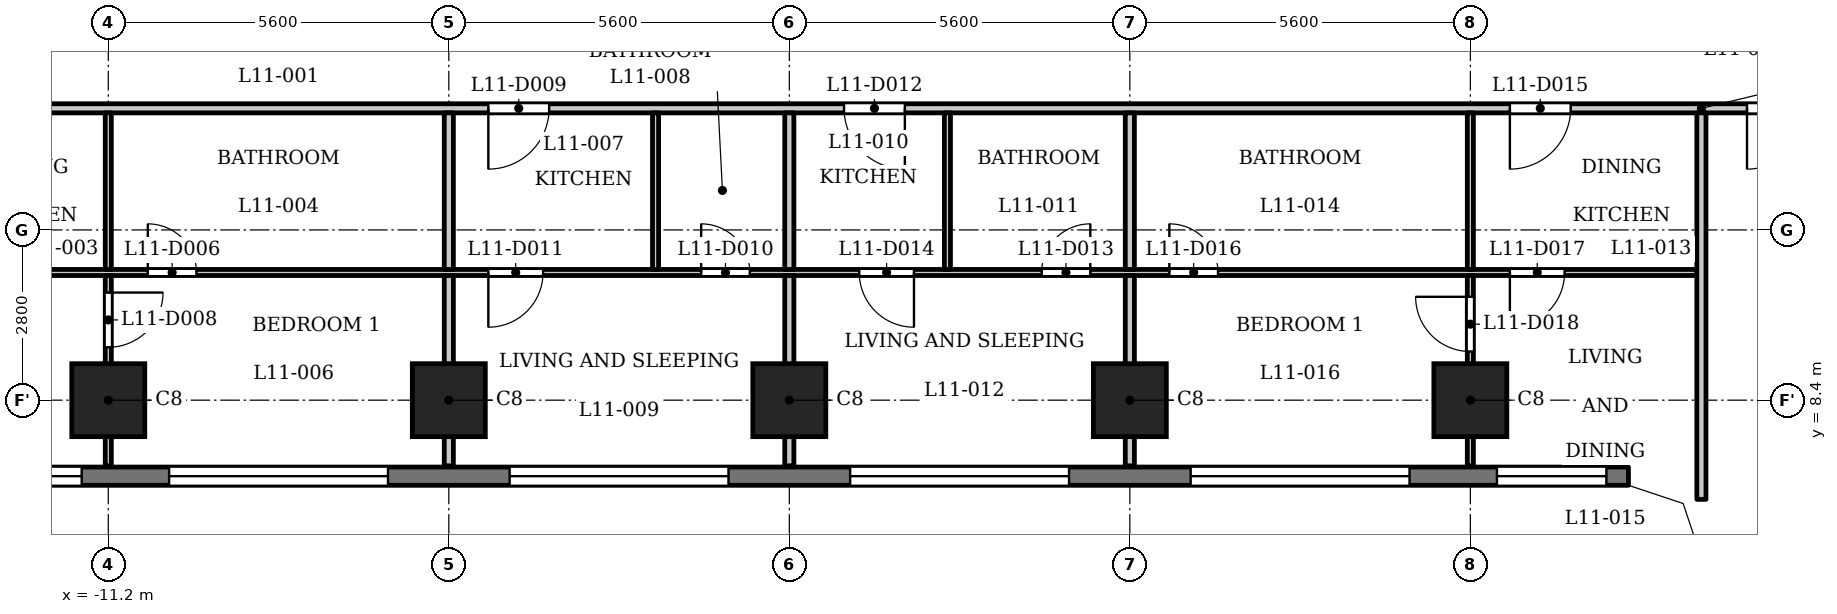
"""IFC4 building model, lengths in metres.
Left out: names, types, materials, properties, quantities, classifications, styles, units other than length and angle.
Written with IfcOpenShell. Run it as: python <this file> out.ifc"""

import sys

from ifc_helpers import new_model, si_unit, direction, frame, frame_2d, origin, origin_2d, place, context, subcontext, project, spatial, polyline, rectangle, outline, extrude, element, fill, save


model = new_model("IFC4")
c1 = context("Model", 3, precision=1e-05, world=origin(), true_north=direction((0.0, 1.0)))
c2 = subcontext(c1, "Body", "Model", "MODEL_VIEW")
j1 = project(units=[si_unit("LENGTHUNIT", "METRE"), si_unit("PLANEANGLEUNIT", "RADIAN")], contexts=[c1])
p1 = place(None, origin())
s1 = spatial("IfcSite", under=j1, at=p1, CompositionType="ELEMENT")
p2 = place(p1, origin())
s2 = spatial("IfcBuilding", under=s1, at=p2, CompositionType="ELEMENT")
p3 = place(p2, frame((0.0, 0.0, 48.0)))
s3 = spatial("IfcBuildingStorey", under=s2, at=p3, CompositionType="ELEMENT", Elevation=48.0)
for number, where, z_axis, x_axis in (
    (1, (-11.2, 8.4, 0.0), (0.0, 0.0, 1.0), (1.0, 0.0, 0.0)),
    (2, (-5.6, 8.4, 0.0), (0.0, 0.0, 1.0), (1.0, 0.0, 0.0)),
    (3, (0.0, 8.4, 0.0), (0.0, 0.0, 1.0), (1.0, 0.0, 0.0)),
    (4, (5.6, 8.4, 0.0), (0.0, 0.0, 1.0), (1.0, 0.0, 0.0)),
    (5, (11.2, 8.4, 0.0), (0.0, 0.0, 1.0), (1.0, 0.0, 0.0)),
):
    element("IfcColumn", number, at=place(p3, frame(where, z_axis=z_axis, x_axis=x_axis)), inside=s3, PredefinedType="COLUMN", context=c2, shape_type="SweptSolid", body=[
        extrude(rectangle(XDim=1.2, YDim=1.2, at=origin_2d()), origin(), (0.0, 0.0, 1.0), 3.5),
    ])
p4 = place(p3, frame((-13.8, 7.15, 0.0), z_axis=(0.0, 0.0, 1.0), x_axis=(1.0, 0.0, 0.0)))
e6 = element("IfcWall", 6, at=p4, inside=s3, PredefinedType="SOLIDWALL", context=c2, shape_type="SweptSolid", body=[
    extrude(rectangle(XDim=27.6, YDim=0.3, at=frame_2d((13.8, 0.0))), origin(), (0.0, 0.0, 1.0), 3.2),
])
p5 = place(p4, frame((0.363, 0.0, 0.9)))
e7 = element("IfcOpeningElement", 7, at=p5, cuts=e6, PredefinedType="OPENING", context=c2, shape_type="SweptSolid", body=[
    extrude(rectangle(XDim=1.8, YDim=1.25, at=frame_2d((0.9, 0.625))), frame((0.0, 0.16, 0.0), z_axis=(0.0, -1.0, 0.0), x_axis=(1.0, 0.0, 0.0)), (0.0, 0.0, 1.0), 0.32),
])
p6 = place(p4, frame((3.6, 0.0, 1.2)))
e8 = element("IfcOpeningElement", 8, at=p6, cuts=e6, PredefinedType="OPENING", context=c2, shape_type="SweptSolid", body=[
    extrude(rectangle(XDim=3.6, YDim=0.95, at=frame_2d((1.8, 0.475))), frame((0.0, 0.16, 0.0), z_axis=(0.0, -1.0, 0.0), x_axis=(1.0, 0.0, 0.0)), (0.0, 0.0, 1.0), 0.32),
])
p7 = place(p4, frame((9.2, 0.0, 1.2)))
e9 = element("IfcOpeningElement", 9, at=p7, cuts=e6, PredefinedType="OPENING", context=c2, shape_type="SweptSolid", body=[
    extrude(rectangle(XDim=3.6, YDim=0.95, at=frame_2d((1.8, 0.475))), frame((0.0, 0.16, 0.0), z_axis=(0.0, -1.0, 0.0), x_axis=(1.0, 0.0, 0.0)), (0.0, 0.0, 1.0), 0.32),
])
p8 = place(p4, frame((14.8, 0.0, 1.2)))
e10 = element("IfcOpeningElement", 10, at=p8, cuts=e6, PredefinedType="OPENING", context=c2, shape_type="SweptSolid", body=[
    extrude(rectangle(XDim=3.6, YDim=0.95, at=frame_2d((1.8, 0.475))), frame((0.0, 0.16, 0.0), z_axis=(0.0, -1.0, 0.0), x_axis=(1.0, 0.0, 0.0)), (0.0, 0.0, 1.0), 0.32),
])
p9 = place(p4, frame((20.4, 0.0, 1.2)))
e11 = element("IfcOpeningElement", 11, at=p9, cuts=e6, PredefinedType="OPENING", context=c2, shape_type="SweptSolid", body=[
    extrude(rectangle(XDim=3.6, YDim=0.95, at=frame_2d((1.8, 0.475))), frame((0.0, 0.16, 0.0), z_axis=(0.0, -1.0, 0.0), x_axis=(1.0, 0.0, 0.0)), (0.0, 0.0, 1.0), 0.32),
])
p10 = place(p4, frame((25.438, 0.0, 0.9)))
e12 = element("IfcOpeningElement", 12, at=p10, cuts=e6, PredefinedType="OPENING", context=c2, shape_type="SweptSolid", body=[
    extrude(rectangle(XDim=1.8, YDim=1.25, at=frame_2d((0.9, 0.625))), frame((0.0, 0.16, 0.0), z_axis=(0.0, -1.0, 0.0), x_axis=(1.0, 0.0, 0.0)), (0.0, 0.0, 1.0), 0.32),
])
p11 = place(p3, frame((-14.925, 10.5, 0.0), z_axis=(0.0, 0.0, 1.0), x_axis=(1.0, 0.0, 0.0)))
e13 = element("IfcWall", 13, at=p11, inside=s3, PredefinedType="PARTITIONING", context=c2, shape_type="SweptSolid", body=[
    extrude(rectangle(XDim=29.85, YDim=0.1, at=frame_2d((14.925, 0.0))), origin(), (0.0, 0.0, 1.0), 3.2),
])
p12 = place(p11, frame((4.375, 0.0, 0.0)))
e14 = element("IfcOpeningElement", 14, at=p12, cuts=e13, PredefinedType="OPENING", context=c2, shape_type="SweptSolid", body=[
    extrude(rectangle(XDim=0.8, YDim=2.1, at=frame_2d((0.4, 1.05))), frame((0.0, 0.06, 0.0), z_axis=(0.0, -1.0, 0.0), x_axis=(1.0, 0.0, 0.0)), (0.0, 0.0, 1.0), 0.12),
])
p13 = place(p11, frame((0.575, 0.0, 0.0)))
e15 = element("IfcOpeningElement", 15, at=p13, cuts=e13, PredefinedType="OPENING", context=c2, shape_type="SweptSolid", body=[
    extrude(rectangle(XDim=0.9, YDim=2.1, at=frame_2d((0.45, 1.05))), frame((0.0, 0.06, 0.0), z_axis=(0.0, -1.0, 0.0), x_axis=(1.0, 0.0, 0.0)), (0.0, 0.0, 1.0), 0.12),
])
p14 = place(p11, frame((13.475, 0.0, 0.0)))
e16 = element("IfcOpeningElement", 16, at=p14, cuts=e13, PredefinedType="OPENING", context=c2, shape_type="SweptSolid", body=[
    extrude(rectangle(XDim=0.8, YDim=2.1, at=frame_2d((0.4, 1.05))), frame((0.0, 0.06, 0.0), z_axis=(0.0, -1.0, 0.0), x_axis=(1.0, 0.0, 0.0)), (0.0, 0.0, 1.0), 0.12),
])
p15 = place(p11, frame((9.975, 0.0, 0.0)))
e17 = element("IfcOpeningElement", 17, at=p15, cuts=e13, PredefinedType="OPENING", context=c2, shape_type="SweptSolid", body=[
    extrude(rectangle(XDim=0.9, YDim=2.1, at=frame_2d((0.45, 1.05))), frame((0.0, 0.06, 0.0), z_axis=(0.0, -1.0, 0.0), x_axis=(1.0, 0.0, 0.0)), (0.0, 0.0, 1.0), 0.12),
])
p16 = place(p11, frame((19.075, 0.0, 0.0)))
e18 = element("IfcOpeningElement", 18, at=p16, cuts=e13, PredefinedType="OPENING", context=c2, shape_type="SweptSolid", body=[
    extrude(rectangle(XDim=0.8, YDim=2.1, at=frame_2d((0.4, 1.05))), frame((0.0, 0.06, 0.0), z_axis=(0.0, -1.0, 0.0), x_axis=(1.0, 0.0, 0.0)), (0.0, 0.0, 1.0), 0.12),
])
p17 = place(p11, frame((16.075, 0.0, 0.0)))
e19 = element("IfcOpeningElement", 19, at=p17, cuts=e13, PredefinedType="OPENING", context=c2, shape_type="SweptSolid", body=[
    extrude(rectangle(XDim=0.9, YDim=2.1, at=frame_2d((0.45, 1.05))), frame((0.0, 0.06, 0.0), z_axis=(0.0, -1.0, 0.0), x_axis=(1.0, 0.0, 0.0)), (0.0, 0.0, 1.0), 0.12),
])
p18 = place(p11, frame((21.175, 0.0, 0.0)))
e20 = element("IfcOpeningElement", 20, at=p18, cuts=e13, PredefinedType="OPENING", context=c2, shape_type="SweptSolid", body=[
    extrude(rectangle(XDim=0.8, YDim=2.1, at=frame_2d((0.4, 1.05))), frame((0.0, 0.06, 0.0), z_axis=(0.0, -1.0, 0.0), x_axis=(1.0, 0.0, 0.0)), (0.0, 0.0, 1.0), 0.12),
])
p19 = place(p11, frame((26.775, 0.0, 0.0)))
e21 = element("IfcOpeningElement", 21, at=p19, cuts=e13, PredefinedType="OPENING", context=c2, shape_type="SweptSolid", body=[
    extrude(rectangle(XDim=0.9, YDim=2.1, at=frame_2d((0.45, 1.05))), frame((0.0, 0.06, 0.0), z_axis=(0.0, -1.0, 0.0), x_axis=(1.0, 0.0, 0.0)), (0.0, 0.0, 1.0), 0.12),
])
p20 = place(p3, frame((-17.4, 13.2, 0.0), z_axis=(0.0, 0.0, 1.0), x_axis=(1.0, 0.0, 0.0)))
e22 = element("IfcWall", 22, at=p20, inside=s3, PredefinedType="PARTITIONING", context=c2, shape_type="SweptSolid", body=[
    extrude(rectangle(XDim=34.8, YDim=0.15, at=frame_2d((17.4, 0.0))), origin(), (0.0, 0.0, 1.0), 3.2),
])
p21 = place(p20, frame((0.75, 0.0, 0.0)))
e23 = element("IfcOpeningElement", 23, at=p21, cuts=e22, PredefinedType="OPENING", context=c2, shape_type="SweptSolid", body=[
    extrude(rectangle(XDim=1.0, YDim=2.1, at=frame_2d((0.5, 1.05))), frame((0.0, 0.085, 0.0), z_axis=(0.0, -1.0, 0.0), x_axis=(1.0, 0.0, 0.0)), (0.0, 0.0, 1.0), 0.17),
])
p22 = place(p20, frame((33.15, 0.0, 0.0)))
e24 = element("IfcOpeningElement", 24, at=p22, cuts=e22, PredefinedType="OPENING", context=c2, shape_type="SweptSolid", body=[
    extrude(rectangle(XDim=1.0, YDim=2.1, at=frame_2d((0.5, 1.05))), frame((0.0, 0.085, 0.0), z_axis=(0.0, -1.0, 0.0), x_axis=(1.0, 0.0, 0.0)), (0.0, 0.0, 1.0), 0.17),
])
p23 = place(p20, frame((3.05, 0.0, 0.0)))
e25 = element("IfcOpeningElement", 25, at=p23, cuts=e22, PredefinedType="OPENING", context=c2, shape_type="SweptSolid", body=[
    extrude(rectangle(XDim=1.0, YDim=2.1, at=frame_2d((0.5, 1.05))), frame((0.0, 0.085, 0.0), z_axis=(0.0, -1.0, 0.0), x_axis=(1.0, 0.0, 0.0)), (0.0, 0.0, 1.0), 0.17),
])
p24 = place(p20, frame((12.45, 0.0, 0.0)))
e26 = element("IfcOpeningElement", 26, at=p24, cuts=e22, PredefinedType="OPENING", context=c2, shape_type="SweptSolid", body=[
    extrude(rectangle(XDim=1.0, YDim=2.1, at=frame_2d((0.5, 1.05))), frame((0.0, 0.085, 0.0), z_axis=(0.0, -1.0, 0.0), x_axis=(1.0, 0.0, 0.0)), (0.0, 0.0, 1.0), 0.17),
])
p25 = place(p20, frame((18.3, 0.0, 0.0)))
e27 = element("IfcOpeningElement", 27, at=p25, cuts=e22, PredefinedType="OPENING", context=c2, shape_type="SweptSolid", body=[
    extrude(rectangle(XDim=1.0, YDim=2.1, at=frame_2d((0.5, 1.05))), frame((0.0, 0.085, 0.0), z_axis=(0.0, -1.0, 0.0), x_axis=(1.0, 0.0, 0.0)), (0.0, 0.0, 1.0), 0.17),
])
p26 = place(p20, frame((29.25, 0.0, 0.0)))
e28 = element("IfcOpeningElement", 28, at=p26, cuts=e22, PredefinedType="OPENING", context=c2, shape_type="SweptSolid", body=[
    extrude(rectangle(XDim=1.0, YDim=2.1, at=frame_2d((0.5, 1.05))), frame((0.0, 0.085, 0.0), z_axis=(0.0, -1.0, 0.0), x_axis=(1.0, 0.0, 0.0)), (0.0, 0.0, 1.0), 0.17),
])
p27 = place(p3, frame((-11.2, 7.32, 0.0), z_axis=(0.0, 0.0, 1.0), x_axis=(0.0, 1.0, 0.0)))
e29 = element("IfcWall", 29, at=p27, inside=s3, PredefinedType="PARTITIONING", context=c2, shape_type="SweptSolid", body=[
    extrude(rectangle(XDim=3.13, YDim=0.1, at=frame_2d((1.565, 0.0))), origin(), (0.0, 0.0, 1.0), 3.2),
])
p28 = place(p27, frame((1.95, 0.0, 0.0)))
e30 = element("IfcOpeningElement", 30, at=p28, cuts=e29, PredefinedType="OPENING", context=c2, shape_type="SweptSolid", body=[
    extrude(rectangle(XDim=0.9, YDim=2.1, at=frame_2d((0.45, 1.05))), frame((0.0, 0.06, 0.0), z_axis=(0.0, -1.0, 0.0), x_axis=(1.0, 0.0, 0.0)), (0.0, 0.0, 1.0), 0.12),
])
p29 = place(p3, frame((-11.2, 10.55, 0.0), z_axis=(0.0, 0.0, 1.0), x_axis=(0.0, 1.0, 0.0)))
e31 = element("IfcWall", 31, at=p29, inside=s3, PredefinedType="PARTITIONING", context=c2, shape_type="SweptSolid", body=[
    extrude(rectangle(XDim=2.575, YDim=0.1, at=frame_2d((1.288, 0.0))), origin(), (0.0, 0.0, 1.0), 3.2),
])
p30 = place(p3, frame((-5.6, 7.32, 0.0), z_axis=(0.0, 0.0, 1.0), x_axis=(0.0, 1.0, 0.0)))
e32 = element("IfcWall", 32, at=p30, inside=s3, PredefinedType="PARTITIONING", context=c2, shape_type="SweptSolid", body=[
    extrude(rectangle(XDim=3.13, YDim=0.15, at=frame_2d((1.565, 0.0))), origin(), (0.0, 0.0, 1.0), 3.2),
])
p31 = place(p3, frame((-5.6, 10.55, 0.0), z_axis=(0.0, 0.0, 1.0), x_axis=(0.0, 1.0, 0.0)))
e33 = element("IfcWall", 33, at=p31, inside=s3, PredefinedType="PARTITIONING", context=c2, shape_type="SweptSolid", body=[
    extrude(rectangle(XDim=2.575, YDim=0.15, at=frame_2d((1.288, 0.0))), origin(), (0.0, 0.0, 1.0), 3.2),
])
p32 = place(p3, frame((-2.2, 10.55, 0.0), z_axis=(0.0, 0.0, 1.0), x_axis=(0.0, 1.0, 0.0)))
e34 = element("IfcWall", 34, at=p32, inside=s3, PredefinedType="PARTITIONING", context=c2, shape_type="SweptSolid", body=[
    extrude(rectangle(XDim=2.575, YDim=0.1, at=frame_2d((1.288, 0.0))), origin(), (0.0, 0.0, 1.0), 3.2),
])
p33 = place(p3, frame((0.0, 7.32, 0.0), z_axis=(0.0, 0.0, 1.0), x_axis=(0.0, 1.0, 0.0)))
e35 = element("IfcWall", 35, at=p33, inside=s3, PredefinedType="PARTITIONING", context=c2, shape_type="SweptSolid", body=[
    extrude(rectangle(XDim=3.13, YDim=0.15, at=frame_2d((1.565, 0.0))), origin(), (0.0, 0.0, 1.0), 3.2),
])
p34 = place(p3, frame((0.0, 10.55, 0.0), z_axis=(0.0, 0.0, 1.0), x_axis=(0.0, 1.0, 0.0)))
e36 = element("IfcWall", 36, at=p34, inside=s3, PredefinedType="PARTITIONING", context=c2, shape_type="SweptSolid", body=[
    extrude(rectangle(XDim=2.575, YDim=0.15, at=frame_2d((1.288, 0.0))), origin(), (0.0, 0.0, 1.0), 3.2),
])
p35 = place(p3, frame((2.6, 10.55, 0.0), z_axis=(0.0, 0.0, 1.0), x_axis=(0.0, 1.0, 0.0)))
e37 = element("IfcWall", 37, at=p35, inside=s3, PredefinedType="PARTITIONING", context=c2, shape_type="SweptSolid", body=[
    extrude(rectangle(XDim=2.575, YDim=0.1, at=frame_2d((1.288, 0.0))), origin(), (0.0, 0.0, 1.0), 3.2),
])
p36 = place(p3, frame((5.6, 7.32, 0.0), z_axis=(0.0, 0.0, 1.0), x_axis=(0.0, 1.0, 0.0)))
e38 = element("IfcWall", 38, at=p36, inside=s3, PredefinedType="PARTITIONING", context=c2, shape_type="SweptSolid", body=[
    extrude(rectangle(XDim=3.13, YDim=0.15, at=frame_2d((1.565, 0.0))), origin(), (0.0, 0.0, 1.0), 3.2),
])
p37 = place(p3, frame((5.6, 10.55, 0.0), z_axis=(0.0, 0.0, 1.0), x_axis=(0.0, 1.0, 0.0)))
e39 = element("IfcWall", 39, at=p37, inside=s3, PredefinedType="PARTITIONING", context=c2, shape_type="SweptSolid", body=[
    extrude(rectangle(XDim=2.575, YDim=0.15, at=frame_2d((1.288, 0.0))), origin(), (0.0, 0.0, 1.0), 3.2),
])
p38 = place(p3, frame((11.2, 7.32, 0.0), z_axis=(0.0, 0.0, 1.0), x_axis=(0.0, 1.0, 0.0)))
e40 = element("IfcWall", 40, at=p38, inside=s3, PredefinedType="PARTITIONING", context=c2, shape_type="SweptSolid", body=[
    extrude(rectangle(XDim=3.13, YDim=0.1, at=frame_2d((1.565, 0.0))), origin(), (0.0, 0.0, 1.0), 3.2),
])
p39 = place(p38, frame((1.88, 0.0, 0.0)))
e41 = element("IfcOpeningElement", 41, at=p39, cuts=e40, PredefinedType="OPENING", context=c2, shape_type="SweptSolid", body=[
    extrude(rectangle(XDim=0.9, YDim=2.1, at=frame_2d((0.45, 1.05))), frame((0.0, 0.06, 0.0), z_axis=(0.0, -1.0, 0.0), x_axis=(1.0, 0.0, 0.0)), (0.0, 0.0, 1.0), 0.12),
])
p40 = place(p3, frame((11.2, 10.55, 0.0), z_axis=(0.0, 0.0, 1.0), x_axis=(0.0, 1.0, 0.0)))
e42 = element("IfcWall", 42, at=p40, inside=s3, PredefinedType="PARTITIONING", context=c2, shape_type="SweptSolid", body=[
    extrude(rectangle(XDim=2.575, YDim=0.1, at=frame_2d((1.288, 0.0))), origin(), (0.0, 0.0, 1.0), 3.2),
])
p41 = place(p3, frame((15.0, 6.769, 0.0), z_axis=(0.0, 0.0, 1.0), x_axis=(0.0, 1.0, 0.0)))
e43 = element("IfcWall", 43, at=p41, inside=s3, PredefinedType="PARTITIONING", context=c2, shape_type="SweptSolid", body=[
    extrude(rectangle(XDim=6.356, YDim=0.15, at=frame_2d((3.178, 0.0))), origin(), (0.0, 0.0, 1.0), 3.2),
])
p42 = place(p3, origin())
e44 = element("IfcWall", 44, at=p42, inside=s3, PredefinedType="SOLIDWALL", context=c2, shape_type="SweptSolid", body=[
    extrude(outline(polyline([(14.937, 6.937), (13.849, 7.3), (13.8, 7.3), (13.8, 7.0), (14.7, 6.7), (15.0, 5.8), (15.3, 5.8), (15.3, 5.849), (14.937, 6.937)])), origin(), (0.0, 0.0, 1.0), 3.2),
])
p43 = place(p22, origin())
e45 = element("IfcDoor", 45, at=p43, inside=s3, OperationType="SINGLE_SWING_LEFT", PredefinedType="DOOR", context=c2, shape_type="SweptSolid", body=[
    extrude(rectangle(XDim=1.0, YDim=2.1, at=frame_2d((0.5, 1.05))), frame((0.0, 0.025, 0.0), z_axis=(0.0, -1.0, 0.0), x_axis=(1.0, 0.0, 0.0)), (0.0, 0.0, 1.0), 0.05),
])
fill(e24, e45)
p44 = place(p12, origin())
e46 = element("IfcDoor", 46, at=p44, inside=s3, OperationType="SINGLE_SWING_RIGHT", PredefinedType="DOOR", context=c2, shape_type="SweptSolid", body=[
    extrude(rectangle(XDim=0.8, YDim=2.1, at=frame_2d((0.4, 1.05))), frame((0.0, 0.025, 0.0), z_axis=(0.0, -1.0, 0.0), x_axis=(1.0, 0.0, 0.0)), (0.0, 0.0, 1.0), 0.05),
])
fill(e14, e46)
p45 = place(p28, origin())
e47 = element("IfcDoor", 47, at=p45, inside=s3, OperationType="SINGLE_SWING_RIGHT", PredefinedType="DOOR", context=c2, shape_type="SweptSolid", body=[
    extrude(rectangle(XDim=0.9, YDim=2.1, at=frame_2d((0.45, 1.05))), frame((0.0, 0.025, 0.0), z_axis=(0.0, -1.0, 0.0), x_axis=(1.0, 0.0, 0.0)), (0.0, 0.0, 1.0), 0.05),
])
fill(e30, e47)
p46 = place(p24, origin())
e48 = element("IfcDoor", 48, at=p46, inside=s3, OperationType="SINGLE_SWING_LEFT", PredefinedType="DOOR", context=c2, shape_type="SweptSolid", body=[
    extrude(rectangle(XDim=1.0, YDim=2.1, at=frame_2d((0.5, 1.05))), frame((0.0, 0.025, 0.0), z_axis=(0.0, -1.0, 0.0), x_axis=(1.0, 0.0, 0.0)), (0.0, 0.0, 1.0), 0.05),
])
fill(e26, e48)
p47 = place(p14, origin())
e49 = element("IfcDoor", 49, at=p47, inside=s3, OperationType="SINGLE_SWING_RIGHT", PredefinedType="DOOR", context=c2, shape_type="SweptSolid", body=[
    extrude(rectangle(XDim=0.8, YDim=2.1, at=frame_2d((0.4, 1.05))), frame((0.0, 0.025, 0.0), z_axis=(0.0, -1.0, 0.0), x_axis=(1.0, 0.0, 0.0)), (0.0, 0.0, 1.0), 0.05),
])
fill(e16, e49)
p48 = place(p15, origin())
e50 = element("IfcDoor", 50, at=p48, inside=s3, OperationType="SINGLE_SWING_LEFT", PredefinedType="DOOR", context=c2, shape_type="SweptSolid", body=[
    extrude(rectangle(XDim=0.9, YDim=2.1, at=frame_2d((0.45, 1.05))), frame((0.0, 0.025, 0.0), z_axis=(0.0, -1.0, 0.0), x_axis=(1.0, 0.0, 0.0)), (0.0, 0.0, 1.0), 0.05),
])
fill(e17, e50)
p49 = place(p25, origin())
e51 = element("IfcDoor", 51, at=p49, inside=s3, OperationType="SINGLE_SWING_RIGHT", PredefinedType="DOOR", context=c2, shape_type="SweptSolid", body=[
    extrude(rectangle(XDim=1.0, YDim=2.1, at=frame_2d((0.5, 1.05))), frame((0.0, 0.025, 0.0), z_axis=(0.0, -1.0, 0.0), x_axis=(1.0, 0.0, 0.0)), (0.0, 0.0, 1.0), 0.05),
])
fill(e27, e51)
p50 = place(p16, origin())
e52 = element("IfcDoor", 52, at=p50, inside=s3, OperationType="SINGLE_SWING_LEFT", PredefinedType="DOOR", context=c2, shape_type="SweptSolid", body=[
    extrude(rectangle(XDim=0.8, YDim=2.1, at=frame_2d((0.4, 1.05))), frame((0.0, 0.025, 0.0), z_axis=(0.0, -1.0, 0.0), x_axis=(1.0, 0.0, 0.0)), (0.0, 0.0, 1.0), 0.05),
])
fill(e18, e52)
p51 = place(p17, origin())
e53 = element("IfcDoor", 53, at=p51, inside=s3, OperationType="SINGLE_SWING_RIGHT", PredefinedType="DOOR", context=c2, shape_type="SweptSolid", body=[
    extrude(rectangle(XDim=0.9, YDim=2.1, at=frame_2d((0.45, 1.05))), frame((0.0, 0.025, 0.0), z_axis=(0.0, -1.0, 0.0), x_axis=(1.0, 0.0, 0.0)), (0.0, 0.0, 1.0), 0.05),
])
fill(e19, e53)
p52 = place(p26, origin())
e54 = element("IfcDoor", 54, at=p52, inside=s3, OperationType="SINGLE_SWING_LEFT", PredefinedType="DOOR", context=c2, shape_type="SweptSolid", body=[
    extrude(rectangle(XDim=1.0, YDim=2.1, at=frame_2d((0.5, 1.05))), frame((0.0, 0.025, 0.0), z_axis=(0.0, -1.0, 0.0), x_axis=(1.0, 0.0, 0.0)), (0.0, 0.0, 1.0), 0.05),
])
fill(e28, e54)
p53 = place(p18, origin())
e55 = element("IfcDoor", 55, at=p53, inside=s3, OperationType="SINGLE_SWING_RIGHT", PredefinedType="DOOR", context=c2, shape_type="SweptSolid", body=[
    extrude(rectangle(XDim=0.8, YDim=2.1, at=frame_2d((0.4, 1.05))), frame((0.0, 0.025, 0.0), z_axis=(0.0, -1.0, 0.0), x_axis=(1.0, 0.0, 0.0)), (0.0, 0.0, 1.0), 0.05),
])
fill(e20, e55)
p54 = place(p19, origin())
e56 = element("IfcDoor", 56, at=p54, inside=s3, OperationType="SINGLE_SWING_LEFT", PredefinedType="DOOR", context=c2, shape_type="SweptSolid", body=[
    extrude(rectangle(XDim=0.9, YDim=2.1, at=frame_2d((0.45, 1.05))), frame((0.0, 0.025, 0.0), z_axis=(0.0, -1.0, 0.0), x_axis=(1.0, 0.0, 0.0)), (0.0, 0.0, 1.0), 0.05),
])
fill(e21, e56)
p55 = place(p39, origin())
e57 = element("IfcDoor", 57, at=p55, inside=s3, OperationType="SINGLE_SWING_LEFT", PredefinedType="DOOR", context=c2, shape_type="SweptSolid", body=[
    extrude(rectangle(XDim=0.9, YDim=2.1, at=frame_2d((0.45, 1.05))), frame((0.0, 0.025, 0.0), z_axis=(0.0, -1.0, 0.0), x_axis=(1.0, 0.0, 0.0)), (0.0, 0.0, 1.0), 0.05),
])
fill(e41, e57)
p56 = place(p5, origin())
e58 = element("IfcWindow", 58, at=p56, inside=s3, PartitioningType="SINGLE_PANEL", PredefinedType="WINDOW", context=c2, shape_type="SweptSolid", body=[
    extrude(rectangle(XDim=1.8, YDim=1.25, at=frame_2d((0.9, 0.625))), frame((0.0, 0.03, 0.0), z_axis=(0.0, -1.0, 0.0), x_axis=(1.0, 0.0, 0.0)), (0.0, 0.0, 1.0), 0.06),
])
fill(e7, e58)
p57 = place(p6, origin())
e59 = element("IfcWindow", 59, at=p57, inside=s3, PartitioningType="SINGLE_PANEL", PredefinedType="WINDOW", context=c2, shape_type="SweptSolid", body=[
    extrude(rectangle(XDim=3.6, YDim=0.95, at=frame_2d((1.8, 0.475))), frame((0.0, 0.03, 0.0), z_axis=(0.0, -1.0, 0.0), x_axis=(1.0, 0.0, 0.0)), (0.0, 0.0, 1.0), 0.06),
])
fill(e8, e59)
p58 = place(p7, origin())
e60 = element("IfcWindow", 60, at=p58, inside=s3, PartitioningType="SINGLE_PANEL", PredefinedType="WINDOW", context=c2, shape_type="SweptSolid", body=[
    extrude(rectangle(XDim=3.6, YDim=0.95, at=frame_2d((1.8, 0.475))), frame((0.0, 0.03, 0.0), z_axis=(0.0, -1.0, 0.0), x_axis=(1.0, 0.0, 0.0)), (0.0, 0.0, 1.0), 0.06),
])
fill(e9, e60)
p59 = place(p8, origin())
e61 = element("IfcWindow", 61, at=p59, inside=s3, PartitioningType="SINGLE_PANEL", PredefinedType="WINDOW", context=c2, shape_type="SweptSolid", body=[
    extrude(rectangle(XDim=3.6, YDim=0.95, at=frame_2d((1.8, 0.475))), frame((0.0, 0.03, 0.0), z_axis=(0.0, -1.0, 0.0), x_axis=(1.0, 0.0, 0.0)), (0.0, 0.0, 1.0), 0.06),
])
fill(e10, e61)
p60 = place(p9, origin())
e62 = element("IfcWindow", 62, at=p60, inside=s3, PartitioningType="SINGLE_PANEL", PredefinedType="WINDOW", context=c2, shape_type="SweptSolid", body=[
    extrude(rectangle(XDim=3.6, YDim=0.95, at=frame_2d((1.8, 0.475))), frame((0.0, 0.03, 0.0), z_axis=(0.0, -1.0, 0.0), x_axis=(1.0, 0.0, 0.0)), (0.0, 0.0, 1.0), 0.06),
])
fill(e11, e62)
p61 = place(p10, origin())
e63 = element("IfcWindow", 63, at=p61, inside=s3, PartitioningType="SINGLE_PANEL", PredefinedType="WINDOW", context=c2, shape_type="SweptSolid", body=[
    extrude(rectangle(XDim=1.8, YDim=1.25, at=frame_2d((0.9, 0.625))), frame((0.0, 0.03, 0.0), z_axis=(0.0, -1.0, 0.0), x_axis=(1.0, 0.0, 0.0)), (0.0, 0.0, 1.0), 0.06),
])
fill(e12, e63)
save(model, sys.argv[1])
